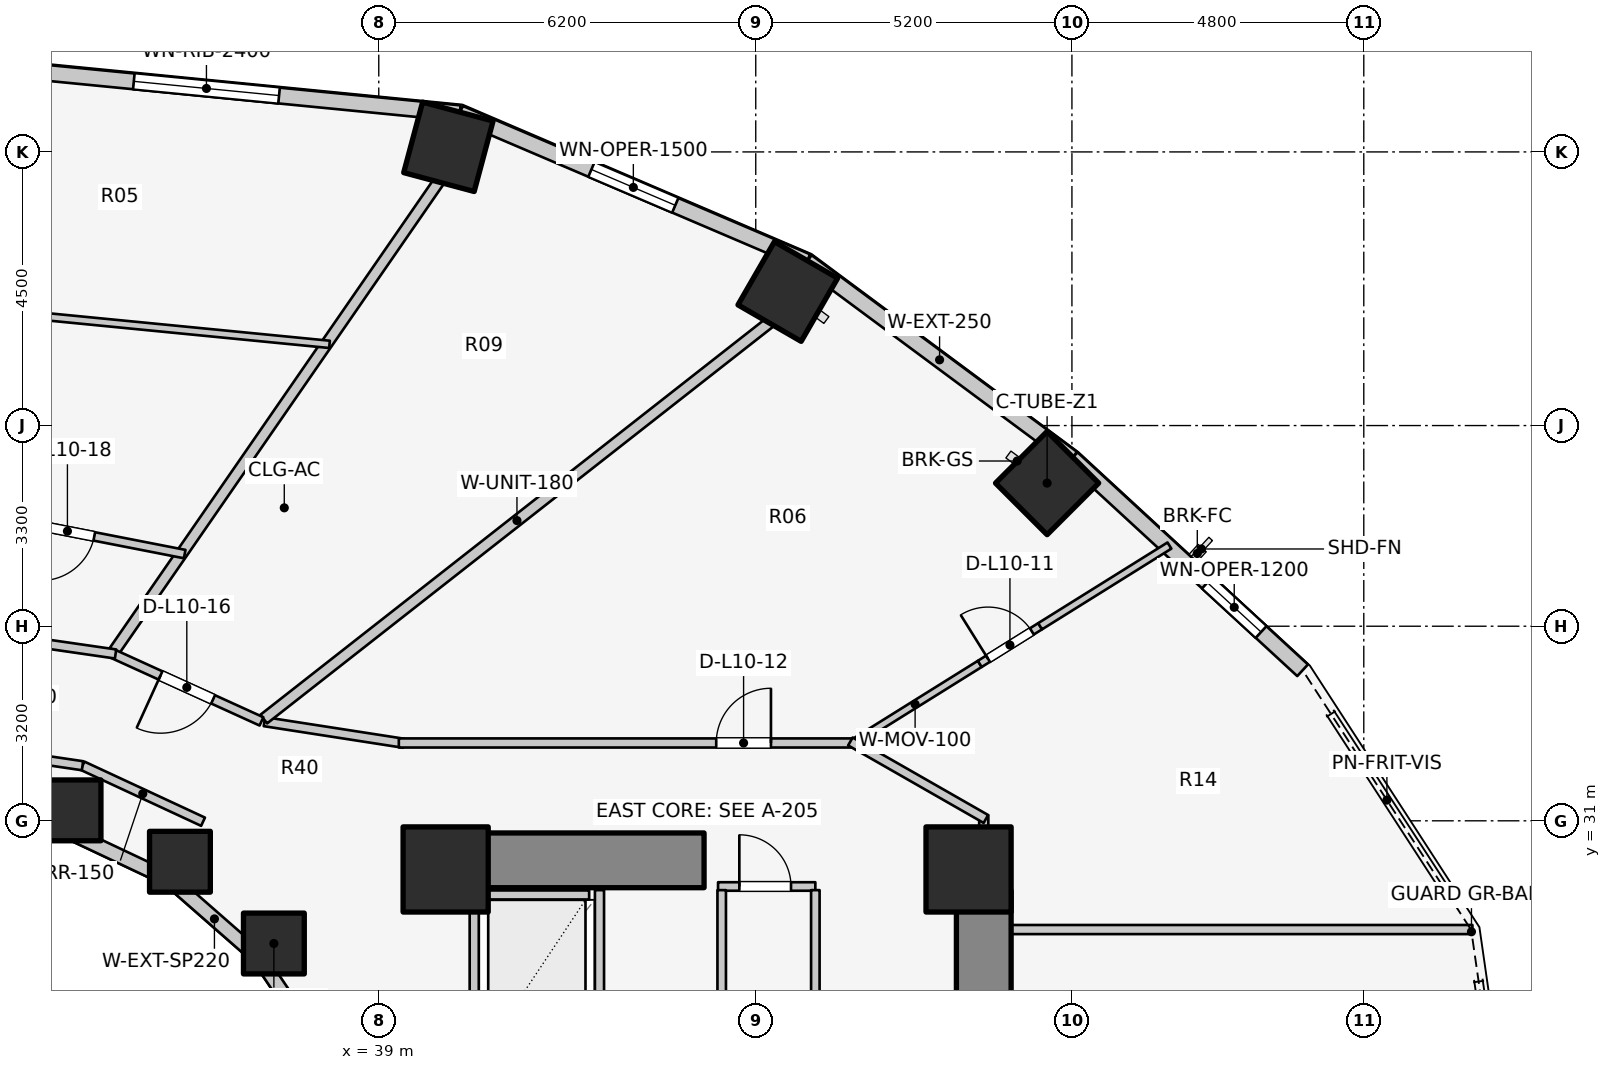
"""IFC4 building model, lengths in metres.
Left out: names, types, materials, properties, quantities, classifications, styles, units other than length and angle.
Written with IfcOpenShell. Run it as: python <this file> out.ifc"""

import sys

from ifc_helpers import new_model, si_unit, direction, frame, frame_2d, origin, origin_2d, place, context, subcontext, project, spatial, rectangle, extrude, element, fill, save


model = new_model("IFC4")
c1 = context("Model", 3, precision=1e-05, world=origin(), true_north=direction((0.0, 1.0)))
c2 = subcontext(c1, "Body", "Model", "MODEL_VIEW")
j1 = project(units=[si_unit("LENGTHUNIT", "METRE"), si_unit("PLANEANGLEUNIT", "RADIAN")], contexts=[c1])
p1 = place(None, origin())
s1 = spatial("IfcSite", under=j1, at=p1, CompositionType="ELEMENT")
p2 = place(p1, origin())
s2 = spatial("IfcBuilding", under=s1, at=p2, CompositionType="ELEMENT")
p3 = place(p2, frame((0.0, 0.0, 36.9)))
s3 = spatial("IfcBuildingStorey", under=s2, at=p3, CompositionType="ELEMENT", Elevation=36.9)
p4 = place(p3, frame((48.95, 17.05, 0.0), z_axis=(0.0, 0.0, 1.0), x_axis=(0.0, 1.0, 0.0)))
e1 = element("IfcWall", 1, at=p4, inside=s3, PredefinedType="SHEAR", context=c2, shape_type="SweptSolid", body=[
    extrude(rectangle(XDim=12.8, YDim=0.9, at=frame_2d((6.4, 0.0))), origin(), (0.0, 0.0, 1.0), 3.1),
])
p5 = place(p3, frame((39.85, 30.35, 0.0), z_axis=(0.0, 0.0, 1.0), x_axis=(1.0, 0.0, 0.0)))
e2 = element("IfcWall", 2, at=p5, inside=s3, PredefinedType="SHEAR", context=c2, shape_type="SweptSolid", body=[
    extrude(rectangle(XDim=4.5, YDim=0.9, at=frame_2d((2.25, 0.0))), origin(), (0.0, 0.0, 1.0), 3.1),
])
for number, where, z_axis, x_axis in (
    (3, (48.7, 30.2, 0.0), (0.0, 0.0, 1.0), (1.0, 0.0, 0.0)),
    (4, (40.1, 30.2, 0.0), (0.0, 0.0, 1.0), (1.0, 0.0, 0.0)),
):
    element("IfcColumn", number, at=place(p3, frame(where, z_axis=z_axis, x_axis=x_axis)), inside=s3, PredefinedType="COLUMN", context=c2, shape_type="SweptSolid", body=[
        extrude(rectangle(XDim=1.4, YDim=1.4, at=origin_2d()), origin(), (0.0, 0.0, 1.0), 3.1),
    ])
p6 = place(p3, frame((37.275, 28.982, 0.0), z_axis=(0.0, 0.0, 1.0), x_axis=(1.0, 0.0, 0.0)))
e5 = element("IfcColumn", 5, at=p6, inside=s3, PredefinedType="COLUMN", context=c2, shape_type="SweptSolid", body=[
    extrude(rectangle(XDim=1.0, YDim=1.0, at=origin_2d()), origin(), (0.0, 0.0, 1.0), 3.1),
])
p7 = place(p3, frame((49.992, 36.554, 0.0), z_axis=(0.0, 0.0, 1.0), x_axis=(0.707106781187, 0.707106781187, 0.0)))
e6 = element("IfcColumn", 6, at=p7, inside=s3, PredefinedType="COLUMN", context=c2, shape_type="SweptSolid", body=[
    extrude(rectangle(XDim=1.2, YDim=1.2, at=origin_2d()), origin(), (0.0, 0.0, 1.0), 3.1),
])
p8 = place(p3, frame((35.73, 30.327, 0.0), z_axis=(0.0, 0.0, 1.0), x_axis=(1.0, 0.0, 0.0)))
e7 = element("IfcColumn", 7, at=p8, inside=s3, PredefinedType="COLUMN", context=c2, shape_type="SweptSolid", body=[
    extrude(rectangle(XDim=1.0, YDim=1.0, at=origin_2d()), origin(), (0.0, 0.0, 1.0), 3.1),
])
p9 = place(p3, frame((45.727, 39.704, 0.0), z_axis=(0.0, 0.0, 1.0), x_axis=(0.5, 0.866025403784, 0.0)))
e8 = element("IfcColumn", 8, at=p9, inside=s3, PredefinedType="COLUMN", context=c2, shape_type="SweptSolid", body=[
    extrude(rectangle(XDim=1.2, YDim=1.2, at=origin_2d()), origin(), (0.0, 0.0, 1.0), 3.1),
])
p10 = place(p3, frame((33.931, 31.172, 0.0), z_axis=(0.0, 0.0, 1.0), x_axis=(1.0, 0.0, 0.0)))
e9 = element("IfcColumn", 9, at=p10, inside=s3, PredefinedType="COLUMN", context=c2, shape_type="SweptSolid", body=[
    extrude(rectangle(XDim=1.0, YDim=1.0, at=origin_2d()), origin(), (0.0, 0.0, 1.0), 3.1),
])
p11 = place(p3, frame((40.145, 42.084, 0.0), z_axis=(0.0, 0.0, 1.0), x_axis=(0.258819045103, 0.965925826289, 0.0)))
e10 = element("IfcColumn", 10, at=p11, inside=s3, PredefinedType="COLUMN", context=c2, shape_type="SweptSolid", body=[
    extrude(rectangle(XDim=1.2, YDim=1.2, at=origin_2d()), origin(), (0.0, 0.0, 1.0), 3.1),
])
p12 = place(p3, frame((38.166, 27.06, 0.0), z_axis=(0.0, 0.0, 1.0), x_axis=(-0.558197800898, 0.829707909492, 0.0)))
e11 = element("IfcWall", 11, at=p12, inside=s3, PredefinedType="STANDARD", context=c2, shape_type="SweptSolid", body=[
    extrude(rectangle(XDim=2.027, YDim=0.23, at=frame_2d((1.013, 0.0))), origin(), (0.0, 0.0, 1.0), 2.16),
])
p13 = place(p3, frame((37.035, 28.742, 0.0), z_axis=(0.0, 0.0, 1.0), x_axis=(-0.752576694707, 0.658504607869, 0.0)))
e12 = element("IfcWall", 12, at=p13, inside=s3, PredefinedType="STANDARD", context=c2, shape_type="SweptSolid", body=[
    extrude(rectangle(XDim=1.959, YDim=0.23, at=frame_2d((0.98, 0.0))), origin(), (0.0, 0.0, 1.0), 2.16),
])
p14 = place(p3, frame((35.56, 30.032, 0.0), z_axis=(0.0, 0.0, 1.0), x_axis=(-0.904179699603, 0.427152280606, 0.0)))
e13 = element("IfcWall", 13, at=p14, inside=s3, PredefinedType="STANDARD", context=c2, shape_type="SweptSolid", body=[
    extrude(rectangle(XDim=1.899, YDim=0.23, at=frame_2d((0.95, 0.0))), origin(), (0.0, 0.0, 1.0), 2.16),
])
p15 = place(p3, frame((33.843, 30.843, 0.0), z_axis=(0.0, 0.0, 1.0), x_axis=(-0.988901730308, 0.148571086668, 0.0)))
e14 = element("IfcWall", 14, at=p15, inside=s3, PredefinedType="STANDARD", context=c2, shape_type="SweptSolid", body=[
    extrude(rectangle(XDim=1.864, YDim=0.23, at=frame_2d((0.932, 0.0))), origin(), (0.0, 0.0, 1.0), 2.16),
])
p16 = place(p3, frame((54.194, 33.476, 0.0), z_axis=(0.0, 0.0, 1.0), x_axis=(-0.735655109293, 0.67735630223, 0.0)))
e15 = element("IfcWall", 15, at=p16, inside=s3, PredefinedType="STANDARD", context=c2, shape_type="SweptSolid", body=[
    extrude(rectangle(XDim=5.151, YDim=0.26, at=frame_2d((2.575, 0.0))), origin(), (0.0, 0.0, 1.0), 2.85),
])
p17 = place(p16, frame((0.929, 0.0, 0.75)))
e16 = element("IfcOpeningElement", 16, at=p17, cuts=e15, PredefinedType="OPENING", context=c2, shape_type="SweptSolid", body=[
    extrude(rectangle(XDim=1.2, YDim=1.5, at=frame_2d((0.6, 0.75))), frame((0.0, 0.14, 0.0), z_axis=(0.0, -1.0, 0.0), x_axis=(1.0, 0.0, 0.0)), (0.0, 0.0, 1.0), 0.28),
])
p18 = place(p3, frame((50.405, 36.965, 0.0), z_axis=(0.0, 0.0, 1.0), x_axis=(-0.803477531792, 0.595335078679, 0.0)))
e17 = element("IfcWall", 17, at=p18, inside=s3, PredefinedType="STANDARD", context=c2, shape_type="SweptSolid", body=[
    extrude(rectangle(XDim=5.43, YDim=0.26, at=frame_2d((2.715, 0.0))), origin(), (0.0, 0.0, 1.0), 2.85),
])
p19 = place(p3, frame((46.042, 40.197, 0.0), z_axis=(0.0, 0.0, 1.0), x_axis=(-0.919612132394, 0.39282760335, 0.0)))
e18 = element("IfcWall", 18, at=p19, inside=s3, PredefinedType="STANDARD", context=c2, shape_type="SweptSolid", body=[
    extrude(rectangle(XDim=6.209, YDim=0.26, at=frame_2d((3.105, 0.0))), origin(), (0.0, 0.0, 1.0), 2.85),
])
p20 = place(p19, frame((2.355, 0.0, 0.75)))
e19 = element("IfcOpeningElement", 19, at=p20, cuts=e18, PredefinedType="OPENING", context=c2, shape_type="SweptSolid", body=[
    extrude(rectangle(XDim=1.5, YDim=1.6, at=frame_2d((0.75, 0.8))), frame((0.0, 0.14, 0.0), z_axis=(0.0, -1.0, 0.0), x_axis=(1.0, 0.0, 0.0)), (0.0, 0.0, 1.0), 0.28),
])
p21 = place(p3, frame((40.332, 42.636, 0.0), z_axis=(0.0, 0.0, 1.0), x_axis=(-0.995247718352, 0.097375454379, 0.0)))
e20 = element("IfcWall", 20, at=p21, inside=s3, PredefinedType="STANDARD", context=c2, shape_type="SweptSolid", body=[
    extrude(rectangle(XDim=8.372, YDim=0.26, at=frame_2d((4.186, 0.0))), origin(), (0.0, 0.0, 1.0), 2.85),
])
p22 = place(p21, frame((2.986, 0.0, 0.75)))
e21 = element("IfcOpeningElement", 21, at=p22, cuts=e20, PredefinedType="OPENING", context=c2, shape_type="SweptSolid", body=[
    extrude(rectangle(XDim=2.4, YDim=1.7, at=frame_2d((1.2, 0.85))), frame((0.0, 0.14, 0.0), z_axis=(0.0, -1.0, 0.0), x_axis=(1.0, 0.0, 0.0)), (0.0, 0.0, 1.0), 0.28),
])
p23 = place(p3, frame((40.74, 29.78, 0.0), z_axis=(0.0, 0.0, 1.0), x_axis=(1.0, 0.0, 0.0)))
e22 = element("IfcWall", 22, at=p23, inside=s3, PredefinedType="SOLIDWALL", context=c2, shape_type="SweptSolid", body=[
    extrude(rectangle(XDim=1.72, YDim=0.15, at=frame_2d((0.86, 0.0))), origin(), (0.0, 0.0, 1.0), 2.855),
])
for number, where, z_axis, x_axis in (
    (23, (40.57, 27.14, 0.0), (0.0, 0.0, 1.0), (0.0, 1.0, 0.0)),
    (24, (42.63, 27.14, 0.0), (0.0, 0.0, 1.0), (0.0, 1.0, 0.0)),
):
    element("IfcWall", number, at=place(p3, frame(where, z_axis=z_axis, x_axis=x_axis)), inside=s3, PredefinedType="SOLIDWALL", context=c2, shape_type="SweptSolid", body=[
        extrude(rectangle(XDim=2.72, YDim=0.15, at=frame_2d((1.36, 0.0))), origin(), (0.0, 0.0, 1.0), 2.855),
    ])
p24 = place(p3, frame((44.58, 29.92, 0.0), z_axis=(0.0, 0.0, 1.0), x_axis=(1.0, 0.0, 0.0)))
e25 = element("IfcWall", 25, at=p24, inside=s3, PredefinedType="PLUMBINGWALL", context=c2, shape_type="SweptSolid", body=[
    extrude(rectangle(XDim=1.6, YDim=0.14, at=frame_2d((0.8, 0.0))), origin(), (0.0, 0.0, 1.0), 2.855),
])
p25 = place(p24, frame((0.35, 0.0, 0.0)))
e26 = element("IfcOpeningElement", 26, at=p25, cuts=e25, PredefinedType="OPENING", context=c2, shape_type="SweptSolid", body=[
    extrude(rectangle(XDim=0.85, YDim=2.05, at=frame_2d((0.425, 1.025))), frame((0.0, 0.08, 0.0), z_axis=(0.0, -1.0, 0.0), x_axis=(1.0, 0.0, 0.0)), (0.0, 0.0, 1.0), 0.16),
])
for number, where, z_axis, x_axis in (
    (27, (44.64, 25.98, 0.0), (0.0, 0.0, 1.0), (0.0, 1.0, 0.0)),
    (28, (46.18, 25.98, 0.0), (0.0, 0.0, 1.0), (0.0, 1.0, 0.0)),
):
    element("IfcWall", number, at=place(p3, frame(where, z_axis=z_axis, x_axis=x_axis)), inside=s3, PredefinedType="PLUMBINGWALL", context=c2, shape_type="SweptSolid", body=[
        extrude(rectangle(XDim=3.88, YDim=0.14, at=frame_2d((1.94, 0.0))), origin(), (0.0, 0.0, 1.0), 2.855),
    ])
p26 = place(p3, frame((36.11, 30.985, 0.0), z_axis=(0.0, 0.0, 1.0), x_axis=(-0.906943449489, 0.421252393975, 0.0)))
e29 = element("IfcWall", 29, at=p26, inside=s3, PredefinedType="PARTITIONING", context=c2, shape_type="SweptSolid", body=[
    extrude(rectangle(XDim=2.186, YDim=0.15, at=frame_2d((1.093, 0.0))), origin(), (0.0, 0.0, 1.0), 2.237),
])
p27 = place(p3, frame((34.127, 31.906, 0.0), z_axis=(0.0, 0.0, 1.0), x_axis=(-0.989268584896, 0.146108408166, 0.0)))
e30 = element("IfcWall", 30, at=p27, inside=s3, PredefinedType="PARTITIONING", context=c2, shape_type="SweptSolid", body=[
    extrude(rectangle(XDim=2.151, YDim=0.15, at=frame_2d((1.075, 0.0))), origin(), (0.0, 0.0, 1.0), 2.237),
])
p28 = place(p3, frame((48.95, 29.212, 0.0), z_axis=(0.0, 0.0, 1.0), x_axis=(1.0, 0.0, 0.0)))
e31 = element("IfcWall", 31, at=p28, inside=s3, PredefinedType="PARTITIONING", context=c2, shape_type="SweptSolid", body=[
    extrude(rectangle(XDim=8.036, YDim=0.15, at=frame_2d((4.018, 0.0))), origin(), (0.0, 0.0, 1.0), 2.855),
])
p29 = place(p3, frame((48.95, 29.8, 0.0), z_axis=(0.0, 0.0, 1.0), x_axis=(0.0, 1.0, 0.0)))
e32 = element("IfcWall", 32, at=p29, inside=s3, PredefinedType="PARTITIONING", context=c2, shape_type="SweptSolid", body=[
    extrude(rectangle(XDim=1.29, YDim=0.15, at=frame_2d((0.645, 0.0))), origin(), (0.0, 0.0, 1.0), 2.069),
])
p30 = place(p3, frame((46.758, 32.253, 0.0), z_axis=(0.0, 0.0, 1.0), x_axis=(0.848408422278, 0.529342185177, 0.0)))
e33 = element("IfcWall", 33, at=p30, inside=s3, PredefinedType="MOVABLE", context=c2, shape_type="SweptSolid", body=[
    extrude(rectangle(XDim=2.507, YDim=0.12, at=frame_2d((1.253, 0.0))), origin(), (0.0, 0.0, 1.0), 2.855),
])
p31 = place(p3, frame((48.884, 33.58, 0.0), z_axis=(0.0, 0.0, 1.0), x_axis=(0.848396621262, 0.529361098903, 0.0)))
e34 = element("IfcWall", 34, at=p31, inside=s3, PredefinedType="MOVABLE", context=c2, shape_type="SweptSolid", body=[
    extrude(rectangle(XDim=1.17, YDim=0.12, at=frame_2d((0.585, 0.0))), origin(), (0.0, 0.0, 1.0), 2.11),
])
p32 = place(p31, frame((0.16, 0.0, 0.0)))
e35 = element("IfcOpeningElement", 35, at=p32, cuts=e34, PredefinedType="OPENING", context=c2, shape_type="SweptSolid", body=[
    extrude(rectangle(XDim=0.85, YDim=2.05, at=frame_2d((0.425, 1.025))), frame((0.0, 0.07, 0.0), z_axis=(0.0, -1.0, 0.0), x_axis=(1.0, 0.0, 0.0)), (0.0, 0.0, 1.0), 0.14),
])
p33 = place(p3, frame((49.877, 34.2, 0.0), z_axis=(0.0, 0.0, 1.0), x_axis=(0.848424873637, 0.529315816687, 0.0)))
e36 = element("IfcWall", 36, at=p33, inside=s3, PredefinedType="MOVABLE", context=c2, shape_type="SweptSolid", body=[
    extrude(rectangle(XDim=2.506, YDim=0.12, at=frame_2d((1.253, 0.0))), origin(), (0.0, 0.0, 1.0), 2.855),
])
p34 = place(p3, frame((37.119, 32.631, 0.0), z_axis=(0.0, 0.0, 1.0), x_axis=(0.988184633586, -0.153268163508, 0.0)))
e37 = element("IfcWall", 37, at=p34, inside=s3, PredefinedType="PARTITIONING", context=c2, shape_type="SweptSolid", body=[
    extrude(rectangle(XDim=2.318, YDim=0.15, at=frame_2d((1.159, 0.0))), origin(), (0.0, 0.0, 1.0), 2.237),
])
p35 = place(p3, frame((39.33, 32.28, 0.0), z_axis=(0.0, 0.0, 1.0), x_axis=(1.0, 0.0, 0.0)))
e38 = element("IfcWall", 38, at=p35, inside=s3, PredefinedType="PARTITIONING", context=c2, shape_type="SweptSolid", body=[
    extrude(rectangle(XDim=7.52, YDim=0.15, at=frame_2d((3.76, 0.0))), origin(), (0.0, 0.0, 1.0), 2.237),
])
p36 = place(p35, frame((5.22, 0.0, 0.0)))
e39 = element("IfcOpeningElement", 39, at=p36, cuts=e38, PredefinedType="OPENING", context=c2, shape_type="SweptSolid", body=[
    extrude(rectangle(XDim=0.9, YDim=2.1, at=frame_2d((0.45, 1.05))), frame((0.0, 0.085, 0.0), z_axis=(0.0, -1.0, 0.0), x_axis=(1.0, 0.0, 0.0)), (0.0, 0.0, 1.0), 0.17),
])
p37 = place(p3, frame((46.757, 32.305, 0.0), z_axis=(0.0, 0.0, 1.0), x_axis=(0.867991349648, -0.496579315857, 0.0)))
e40 = element("IfcWall", 40, at=p37, inside=s3, PredefinedType="PARTITIONING", context=c2, shape_type="SweptSolid", body=[
    extrude(rectangle(XDim=2.567, YDim=0.15, at=frame_2d((1.283, 0.0))), origin(), (0.0, 0.0, 1.0), 2.069),
])
p38 = place(p3, frame((37.108, 32.673, 0.0), z_axis=(0.0, 0.0, 1.0), x_axis=(0.78700868866, 0.616941912966, 0.0)))
e41 = element("IfcWall", 41, at=p38, inside=s3, PredefinedType="PARTITIONING", context=c2, shape_type="SweptSolid", body=[
    extrude(rectangle(XDim=10.583, YDim=0.18, at=frame_2d((5.292, 0.0))), origin(), (0.0, 0.0, 1.0), 2.237),
])
p39 = place(p3, frame((34.653, 33.796, 0.0), z_axis=(0.0, 0.0, 1.0), x_axis=(0.568631434817, 0.822592421153, 0.0)))
e42 = element("IfcWall", 42, at=p39, inside=s3, PredefinedType="PARTITIONING", context=c2, shape_type="SweptSolid", body=[
    extrude(rectangle(XDim=9.394, YDim=0.18, at=frame_2d((4.697, 0.0))), origin(), (0.0, 0.0, 1.0), 2.237),
])
p40 = place(p3, frame((37.071, 32.635, 0.0), z_axis=(0.0, 0.0, 1.0), x_axis=(-0.910186679378, 0.414198272186, 0.0)))
e43 = element("IfcWall", 43, at=p40, inside=s3, PredefinedType="PARTITIONING", context=c2, shape_type="SweptSolid", body=[
    extrude(rectangle(XDim=2.698, YDim=0.15, at=frame_2d((1.349, 0.0))), origin(), (0.0, 0.0, 1.0), 2.237),
])
p41 = place(p40, frame((0.874, 0.0, 0.0)))
e44 = element("IfcOpeningElement", 44, at=p41, cuts=e43, PredefinedType="OPENING", context=c2, shape_type="SweptSolid", body=[
    extrude(rectangle(XDim=0.95, YDim=2.1, at=frame_2d((0.475, 1.05))), frame((0.0, 0.085, 0.0), z_axis=(0.0, -1.0, 0.0), x_axis=(1.0, 0.0, 0.0)), (0.0, 0.0, 1.0), 0.17),
])
p42 = place(p3, frame((38.19, 38.835, 0.0), z_axis=(0.0, 0.0, 1.0), x_axis=(-0.995257435484, 0.097276087063, 0.0)))
e45 = element("IfcWall", 45, at=p42, inside=s3, PredefinedType="MOVABLE", context=c2, shape_type="SweptSolid", body=[
    extrude(rectangle(XDim=6.229, YDim=0.12, at=frame_2d((3.115, 0.0))), origin(), (0.0, 0.0, 1.0), 2.237),
])
p43 = place(p3, frame((34.671, 33.744, 0.0), z_axis=(0.0, 0.0, 1.0), x_axis=(-0.989701115085, 0.143149232617, 0.0)))
e46 = element("IfcWall", 46, at=p43, inside=s3, PredefinedType="PARTITIONING", context=c2, shape_type="SweptSolid", body=[
    extrude(rectangle(XDim=2.749, YDim=0.15, at=frame_2d((1.375, 0.0))), origin(), (0.0, 0.0, 1.0), 2.237),
])
p44 = place(p3, frame((35.808, 35.386, 0.0), z_axis=(0.0, 0.0, 1.0), x_axis=(-0.981464096276, 0.191646100197, 0.0)))
e47 = element("IfcWall", 47, at=p44, inside=s3, PredefinedType="PLUMBINGWALL", context=c2, shape_type="SweptSolid", body=[
    extrude(rectangle(XDim=3.93, YDim=0.14, at=frame_2d((1.965, 0.0))), origin(), (0.0, 0.0, 1.0), 2.237),
])
p45 = place(p44, frame((1.515, 0.0, 0.0)))
e48 = element("IfcOpeningElement", 48, at=p45, cuts=e47, PredefinedType="OPENING", context=c2, shape_type="SweptSolid", body=[
    extrude(rectangle(XDim=0.9, YDim=2.1, at=frame_2d((0.45, 1.05))), frame((0.0, 0.08, 0.0), z_axis=(0.0, -1.0, 0.0), x_axis=(1.0, 0.0, 0.0)), (0.0, 0.0, 1.0), 0.16),
])
p46 = place(p17, origin())
e49 = element("IfcWindow", 49, at=p46, inside=s3, PartitioningType="SINGLE_PANEL", PredefinedType="WINDOW", context=c2, shape_type="SweptSolid", body=[
    extrude(rectangle(XDim=1.2, YDim=1.5, at=frame_2d((0.6, 0.75))), frame((0.0, 0.03, 0.0), z_axis=(0.0, -1.0, 0.0), x_axis=(1.0, 0.0, 0.0)), (0.0, 0.0, 1.0), 0.06),
])
fill(e16, e49)
p47 = place(p20, origin())
e50 = element("IfcWindow", 50, at=p47, inside=s3, PartitioningType="SINGLE_PANEL", PredefinedType="WINDOW", context=c2, shape_type="SweptSolid", body=[
    extrude(rectangle(XDim=1.5, YDim=1.6, at=frame_2d((0.75, 0.8))), frame((0.0, 0.03, 0.0), z_axis=(0.0, -1.0, 0.0), x_axis=(1.0, 0.0, 0.0)), (0.0, 0.0, 1.0), 0.06),
])
fill(e19, e50)
p48 = place(p22, origin())
e51 = element("IfcWindow", 51, at=p48, inside=s3, PartitioningType="SINGLE_PANEL", PredefinedType="WINDOW", context=c2, shape_type="SweptSolid", body=[
    extrude(rectangle(XDim=2.4, YDim=1.7, at=frame_2d((1.2, 0.85))), frame((0.0, 0.03, 0.0), z_axis=(0.0, -1.0, 0.0), x_axis=(1.0, 0.0, 0.0)), (0.0, 0.0, 1.0), 0.06),
])
fill(e21, e51)
p49 = place(p25, origin())
e52 = element("IfcDoor", 52, at=p49, inside=s3, OperationType="SINGLE_SWING_LEFT", PredefinedType="DOOR", context=c2, shape_type="SweptSolid", body=[
    extrude(rectangle(XDim=0.85, YDim=2.05, at=frame_2d((0.425, 1.025))), frame((0.0, 0.025, 0.0), z_axis=(0.0, -1.0, 0.0), x_axis=(1.0, 0.0, 0.0)), (0.0, 0.0, 1.0), 0.05),
])
fill(e26, e52)
p50 = place(p32, origin())
e53 = element("IfcDoor", 53, at=p50, inside=s3, OperationType="SINGLE_SWING_LEFT", PredefinedType="DOOR", context=c2, shape_type="SweptSolid", body=[
    extrude(rectangle(XDim=0.85, YDim=2.05, at=frame_2d((0.425, 1.025))), frame((0.0, 0.025, 0.0), z_axis=(0.0, -1.0, 0.0), x_axis=(1.0, 0.0, 0.0)), (0.0, 0.0, 1.0), 0.05),
])
fill(e35, e53)
p51 = place(p36, origin())
e54 = element("IfcDoor", 54, at=p51, inside=s3, OperationType="SINGLE_SWING_RIGHT", PredefinedType="DOOR", context=c2, shape_type="SweptSolid", body=[
    extrude(rectangle(XDim=0.9, YDim=2.1, at=frame_2d((0.45, 1.05))), frame((0.0, 0.025, 0.0), z_axis=(0.0, -1.0, 0.0), x_axis=(1.0, 0.0, 0.0)), (0.0, 0.0, 1.0), 0.05),
])
fill(e39, e54)
p52 = place(p41, origin())
e55 = element("IfcDoor", 55, at=p52, inside=s3, OperationType="SINGLE_SWING_RIGHT", PredefinedType="DOOR", context=c2, shape_type="SweptSolid", body=[
    extrude(rectangle(XDim=0.95, YDim=2.1, at=frame_2d((0.475, 1.05))), frame((0.0, 0.025, 0.0), z_axis=(0.0, -1.0, 0.0), x_axis=(1.0, 0.0, 0.0)), (0.0, 0.0, 1.0), 0.05),
])
fill(e44, e55)
p53 = place(p45, origin())
e56 = element("IfcDoor", 56, at=p53, inside=s3, OperationType="SINGLE_SWING_RIGHT", PredefinedType="DOOR", context=c2, shape_type="SweptSolid", body=[
    extrude(rectangle(XDim=0.9, YDim=2.1, at=frame_2d((0.45, 1.05))), frame((0.0, 0.025, 0.0), z_axis=(0.0, -1.0, 0.0), x_axis=(1.0, 0.0, 0.0)), (0.0, 0.0, 1.0), 0.05),
])
fill(e48, e56)
save(model, sys.argv[1])
